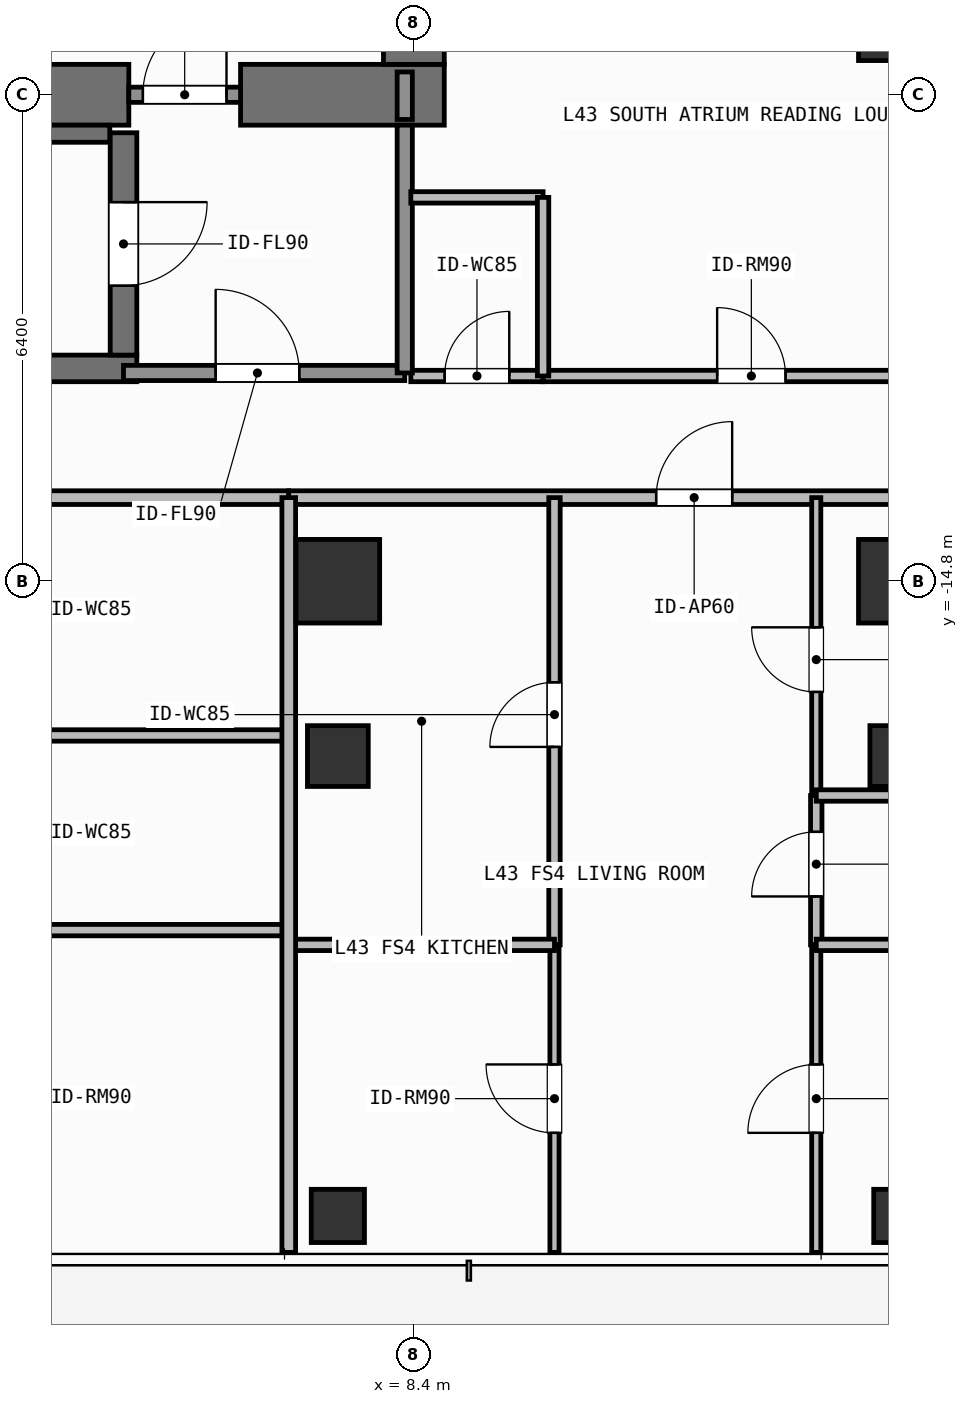
"""IFC4 building model, lengths in metres.
Left out: names, types, materials, properties, quantities, classifications, styles, units other than length and angle.
Written with IfcOpenShell. Run it as: python <this file> out.ifc"""

import sys

from ifc_helpers import new_model, si_unit, direction, frame, frame_2d, origin, origin_2d, place, context, subcontext, project, spatial, rectangle, hollow_rectangle, extrude, element, fill, save


model = new_model("IFC4")
c1 = context("Model", 3, precision=1e-05, world=origin(), true_north=direction((0.0, 1.0)))
c2 = subcontext(c1, "Body", "Model", "MODEL_VIEW")
j1 = project(units=[si_unit("LENGTHUNIT", "METRE"), si_unit("PLANEANGLEUNIT", "RADIAN")], contexts=[c1])
p1 = place(None, origin())
s1 = spatial("IfcSite", under=j1, at=p1, CompositionType="ELEMENT")
p2 = place(p1, origin())
s2 = spatial("IfcBuilding", under=s1, at=p2, CompositionType="ELEMENT")
p3 = place(p2, frame((0.0, 0.0, 175.8)))
s3 = spatial("IfcBuildingStorey", under=s2, at=p3, CompositionType="ELEMENT", Elevation=175.8)
p4 = place(p3, frame((-2.62, -8.4, 0.0), z_axis=(0.0, 0.0, 1.0), x_axis=(1.0, 0.0, 0.0)))
e1 = element("IfcWall", 1, at=p4, inside=s3, PredefinedType="SHEAR", context=c2, shape_type="SweptSolid", body=[
    extrude(rectangle(XDim=7.27, YDim=0.8, at=frame_2d((3.635, 0.0))), origin(), (0.0, 0.0, 1.0), 3.9),
])
p5 = place(p3, frame((6.12, -8.4, 0.0), z_axis=(0.0, 0.0, 1.0), x_axis=(1.0, 0.0, 0.0)))
e2 = element("IfcWall", 2, at=p5, inside=s3, PredefinedType="SHEAR", context=c2, shape_type="SweptSolid", body=[
    extrude(rectangle(XDim=2.68, YDim=0.8, at=frame_2d((1.34, 0.0))), origin(), (0.0, 0.0, 1.0), 3.9),
])
p6 = place(p3, frame((8.4, -8.0, 0.0), z_axis=(0.0, 0.0, 1.0), x_axis=(0.0, 1.0, 0.0)))
e3 = element("IfcWall", 3, at=p6, inside=s3, PredefinedType="SHEAR", context=c2, shape_type="SweptSolid", body=[
    extrude(rectangle(XDim=2.175, YDim=0.8, at=frame_2d((1.087, 0.0))), origin(), (0.0, 0.0, 1.0), 3.9),
])
p7 = place(p3, frame((-2.555, -12.0, 0.0), z_axis=(0.0, 0.0, 1.0), x_axis=(1.0, 0.0, 0.0)))
e4 = element("IfcWall", 4, at=p7, inside=s3, PredefinedType="SHEAR", context=c2, shape_type="SweptSolid", body=[
    extrude(rectangle(XDim=7.31, YDim=0.35, at=frame_2d((3.655, 0.0))), origin(), (0.0, 0.0, 1.0), 3.9),
])
p8 = place(p3, frame((-2.2, -8.913, 0.0), z_axis=(0.0, 0.0, 1.0), x_axis=(1.0, 0.0, 0.0)))
e5 = element("IfcWall", 5, at=p8, inside=s3, PredefinedType="SHEAR", context=c2, shape_type="SweptSolid", body=[
    extrude(rectangle(XDim=6.6, YDim=0.225, at=frame_2d((3.3, 0.0))), origin(), (0.0, 0.0, 1.0), 3.9),
])
p9 = place(p3, frame((4.58, -8.9, 0.0), z_axis=(0.0, 0.0, 1.0), x_axis=(0.0, -1.0, 0.0)))
e6 = element("IfcWall", 6, at=p9, inside=s3, PredefinedType="SHEAR", context=c2, shape_type="SweptSolid", body=[
    extrude(rectangle(XDim=2.925, YDim=0.35, at=frame_2d((1.462, 0.0))), origin(), (0.0, 0.0, 1.0), 3.9),
])
p10 = place(p9, frame((0.913, 0.0, 0.0)))
e7 = element("IfcOpeningElement", 7, at=p10, cuts=e6, PredefinedType="OPENING", context=c2, shape_type="SweptSolid", body=[
    extrude(rectangle(XDim=1.1, YDim=2.15, at=frame_2d((0.55, 1.075))), frame((0.0, 0.185, 0.0), z_axis=(0.0, -1.0, 0.0), x_axis=(1.0, 0.0, 0.0)), (0.0, 0.0, 1.0), 0.37),
])
for number, where, z_axis, x_axis in (
    (8, (7.4, -14.8, 0.0), (0.0, 0.0, 1.0), (1.0, 0.0, 0.0)),
    (9, (14.8, -14.8, 0.0), (0.0, 0.0, 1.0), (1.0, 0.0, 0.0)),
    (10, (14.8, -7.4, 0.0), (0.0, 0.0, 1.0), (1.0, 0.0, 0.0)),
):
    element("IfcColumn", number, at=place(p3, frame(where, z_axis=z_axis, x_axis=x_axis)), inside=s3, PredefinedType="COLUMN", context=c2, shape_type="SweptSolid", body=[
        extrude(rectangle(XDim=1.1, YDim=1.1, at=origin_2d()), origin(), (0.0, 0.0, 1.0), 3.9),
    ])
for number, where, z_axis, x_axis in (
    (11, (7.4, -17.1, 0.0), (0.0, 0.0, 1.0), (1.0, 0.0, 0.0)),
    (12, (14.8, -17.1, 0.0), (0.0, 0.0, 1.0), (1.0, 0.0, 0.0)),
):
    element("IfcColumn", number, at=place(p3, frame(where, z_axis=z_axis, x_axis=x_axis)), inside=s3, PredefinedType="COLUMN", context=c2, shape_type="SweptSolid", body=[
        extrude(hollow_rectangle(XDim=0.8, YDim=0.8, WallThickness=0.036, at=origin_2d()), origin(), (0.0, 0.0, 1.0), 3.9),
    ])
for number, where, z_axis, x_axis in (
    (13, (7.4, -23.15, 0.0), (0.0, 0.0, 1.0), (1.0, 0.0, 0.0)),
    (14, (14.8, -23.15, 0.0), (0.0, 0.0, 1.0), (1.0, 0.0, 0.0)),
):
    element("IfcColumn", number, at=place(p3, frame(where, z_axis=z_axis, x_axis=x_axis)), inside=s3, PredefinedType="COLUMN", context=c2, shape_type="SweptSolid", body=[
        extrude(hollow_rectangle(XDim=0.7, YDim=0.7, WallThickness=0.032, at=origin_2d()), origin(), (0.0, 0.0, 1.0), 3.9),
    ])
p11 = place(p3, frame((4.58, -12.06, 0.0), z_axis=(0.0, 0.0, 1.0), x_axis=(1.0, 0.0, 0.0)))
e15 = element("IfcWall", 15, at=p11, inside=s3, PredefinedType="SOLIDWALL", context=c2, shape_type="SweptSolid", body=[
    extrude(rectangle(XDim=3.7, YDim=0.2, at=frame_2d((1.85, 0.0))), origin(), (0.0, 0.0, 1.0), 3.68),
])
p12 = place(p11, frame((1.212, 0.0, 0.0)))
e16 = element("IfcOpeningElement", 16, at=p12, cuts=e15, PredefinedType="OPENING", context=c2, shape_type="SweptSolid", body=[
    extrude(rectangle(XDim=1.1, YDim=2.15, at=frame_2d((0.55, 1.075))), frame((0.0, 0.11, 0.0), z_axis=(0.0, -1.0, 0.0), x_axis=(1.0, 0.0, 0.0)), (0.0, 0.0, 1.0), 0.22),
])
p13 = place(p3, frame((4.65, -8.4, 0.0), z_axis=(0.0, 0.0, 1.0), x_axis=(1.0, 0.0, 0.0)))
e17 = element("IfcWall", 17, at=p13, inside=s3, PredefinedType="SOLIDWALL", context=c2, shape_type="SweptSolid", body=[
    extrude(rectangle(XDim=1.47, YDim=0.2, at=frame_2d((0.735, 0.0))), origin(), (0.0, 0.0, 1.0), 2.82),
])
p14 = place(p13, frame((0.185, 0.0, 0.0)))
e18 = element("IfcOpeningElement", 18, at=p14, cuts=e17, PredefinedType="OPENING", context=c2, shape_type="SweptSolid", body=[
    extrude(rectangle(XDim=1.1, YDim=2.15, at=frame_2d((0.55, 1.075))), frame((0.0, 0.11, 0.0), z_axis=(0.0, -1.0, 0.0), x_axis=(1.0, 0.0, 0.0)), (0.0, 0.0, 1.0), 0.22),
])
p15 = place(p3, frame((8.36, -12.1, 0.0), z_axis=(0.0, 0.0, 1.0), x_axis=(1.0, 0.0, 0.0)))
e19 = element("IfcWall", 19, at=p15, inside=s3, PredefinedType="PARTITIONING", context=c2, shape_type="SweptSolid", body=[
    extrude(rectangle(XDim=1.74, YDim=0.15, at=frame_2d((0.87, 0.0))), origin(), (0.0, 0.0, 1.0), 3.68),
])
p16 = place(p15, frame((0.445, 0.0, 0.0)))
e20 = element("IfcOpeningElement", 20, at=p16, cuts=e19, PredefinedType="OPENING", context=c2, shape_type="SweptSolid", body=[
    extrude(rectangle(XDim=0.85, YDim=2.1, at=frame_2d((0.425, 1.05))), frame((0.0, 0.085, 0.0), z_axis=(0.0, -1.0, 0.0), x_axis=(1.0, 0.0, 0.0)), (0.0, 0.0, 1.0), 0.17),
])
p17 = place(p3, frame((10.1, -12.1, 0.0), z_axis=(0.0, 0.0, 1.0), x_axis=(1.0, 0.0, 0.0)))
e21 = element("IfcWall", 21, at=p17, inside=s3, PredefinedType="PARTITIONING", context=c2, shape_type="SweptSolid", body=[
    extrude(rectangle(XDim=5.48, YDim=0.15, at=frame_2d((2.74, 0.0))), origin(), (0.0, 0.0, 1.0), 3.68),
])
p18 = place(p17, frame((2.29, 0.0, 0.0)))
e22 = element("IfcOpeningElement", 22, at=p18, cuts=e21, PredefinedType="OPENING", context=c2, shape_type="SweptSolid", body=[
    extrude(rectangle(XDim=0.9, YDim=2.1, at=frame_2d((0.45, 1.05))), frame((0.0, 0.085, 0.0), z_axis=(0.0, -1.0, 0.0), x_axis=(1.0, 0.0, 0.0)), (0.0, 0.0, 1.0), 0.17),
])
p19 = place(p3, frame((-1.9, -13.7, 0.0), z_axis=(0.0, 0.0, 1.0), x_axis=(1.0, 0.0, 0.0)))
e23 = element("IfcWall", 23, at=p19, inside=s3, PredefinedType="PARTITIONING", context=c2, shape_type="SweptSolid", body=[
    extrude(rectangle(XDim=8.654, YDim=0.18, at=frame_2d((4.327, 0.0))), origin(), (0.0, 0.0, 1.0), 3.68),
])
p20 = place(p19, frame((2.664, 0.0, 0.0)))
e24 = element("IfcOpeningElement", 24, at=p20, cuts=e23, PredefinedType="OPENING", context=c2, shape_type="SweptSolid", body=[
    extrude(rectangle(XDim=1.0, YDim=2.2, at=frame_2d((0.5, 1.1))), frame((0.0, 0.1, 0.0), z_axis=(0.0, -1.0, 0.0), x_axis=(1.0, 0.0, 0.0)), (0.0, 0.0, 1.0), 0.2),
])
p21 = place(p3, frame((6.754, -13.7, 0.0), z_axis=(0.0, 0.0, 1.0), x_axis=(1.0, 0.0, 0.0)))
e25 = element("IfcWall", 25, at=p21, inside=s3, PredefinedType="PARTITIONING", context=c2, shape_type="SweptSolid", body=[
    extrude(rectangle(XDim=11.566, YDim=0.18, at=frame_2d((5.783, 0.0))), origin(), (0.0, 0.0, 1.0), 3.68),
])
p22 = place(p21, frame((4.833, 0.0, 0.0)))
e26 = element("IfcOpeningElement", 26, at=p22, cuts=e25, PredefinedType="OPENING", context=c2, shape_type="SweptSolid", body=[
    extrude(rectangle(XDim=1.0, YDim=2.2, at=frame_2d((0.5, 1.1))), frame((0.0, 0.1, 0.0), z_axis=(0.0, -1.0, 0.0), x_axis=(1.0, 0.0, 0.0)), (0.0, 0.0, 1.0), 0.2),
])
p23 = place(p3, frame((10.25, -19.584, 0.0), z_axis=(0.0, 0.0, 1.0), x_axis=(0.0, 1.0, 0.0)))
e27 = element("IfcWall", 27, at=p23, inside=s3, PredefinedType="PARTITIONING", context=c2, shape_type="SweptSolid", body=[
    extrude(rectangle(XDim=5.884, YDim=0.15, at=frame_2d((2.942, 0.0))), origin(), (0.0, 0.0, 1.0), 3.68),
])
p24 = place(p23, frame((2.604, 0.0, 0.0)))
e28 = element("IfcOpeningElement", 28, at=p24, cuts=e27, PredefinedType="OPENING", context=c2, shape_type="SweptSolid", body=[
    extrude(rectangle(XDim=0.85, YDim=2.1, at=frame_2d((0.425, 1.05))), frame((0.0, 0.085, 0.0), z_axis=(0.0, -1.0, 0.0), x_axis=(1.0, 0.0, 0.0)), (0.0, 0.0, 1.0), 0.17),
])
p25 = place(p3, frame((10.25, -23.63, 0.0), z_axis=(0.0, 0.0, 1.0), x_axis=(0.0, 1.0, 0.0)))
e29 = element("IfcWall", 29, at=p25, inside=s3, PredefinedType="PARTITIONING", context=c2, shape_type="SweptSolid", body=[
    extrude(rectangle(XDim=4.046, YDim=0.12, at=frame_2d((2.023, 0.0))), origin(), (0.0, 0.0, 1.0), 3.68),
])
p26 = place(p25, frame((1.573, 0.0, 0.0)))
e30 = element("IfcOpeningElement", 30, at=p26, cuts=e29, PredefinedType="OPENING", context=c2, shape_type="SweptSolid", body=[
    extrude(rectangle(XDim=0.9, YDim=2.1, at=frame_2d((0.45, 1.05))), frame((0.0, 0.07, 0.0), z_axis=(0.0, -1.0, 0.0), x_axis=(1.0, 0.0, 0.0)), (0.0, 0.0, 1.0), 0.14),
])
p27 = place(p3, frame((13.694, -19.584, 0.0), z_axis=(0.0, 0.0, 1.0), x_axis=(0.0, 1.0, 0.0)))
e31 = element("IfcWall", 31, at=p27, inside=s3, PredefinedType="PARTITIONING", context=c2, shape_type="SweptSolid", body=[
    extrude(rectangle(XDim=1.965, YDim=0.15, at=frame_2d((0.982, 0.0))), origin(), (0.0, 0.0, 1.0), 3.68),
])
p28 = place(p27, frame((0.637, 0.0, 0.0)))
e32 = element("IfcOpeningElement", 32, at=p28, cuts=e31, PredefinedType="OPENING", context=c2, shape_type="SweptSolid", body=[
    extrude(rectangle(XDim=0.85, YDim=2.1, at=frame_2d((0.425, 1.05))), frame((0.0, 0.085, 0.0), z_axis=(0.0, -1.0, 0.0), x_axis=(1.0, 0.0, 0.0)), (0.0, 0.0, 1.0), 0.17),
])
p29 = place(p3, frame((13.694, -17.619, 0.0), z_axis=(0.0, 0.0, 1.0), x_axis=(0.0, 1.0, 0.0)))
e33 = element("IfcWall", 33, at=p29, inside=s3, PredefinedType="PARTITIONING", context=c2, shape_type="SweptSolid", body=[
    extrude(rectangle(XDim=3.919, YDim=0.12, at=frame_2d((1.959, 0.0))), origin(), (0.0, 0.0, 1.0), 3.68),
])
p30 = place(p29, frame((1.363, 0.0, 0.0)))
e34 = element("IfcOpeningElement", 34, at=p30, cuts=e33, PredefinedType="OPENING", context=c2, shape_type="SweptSolid", body=[
    extrude(rectangle(XDim=0.85, YDim=2.1, at=frame_2d((0.425, 1.05))), frame((0.0, 0.07, 0.0), z_axis=(0.0, -1.0, 0.0), x_axis=(1.0, 0.0, 0.0)), (0.0, 0.0, 1.0), 0.14),
])
p31 = place(p3, frame((13.694, -23.63, 0.0), z_axis=(0.0, 0.0, 1.0), x_axis=(0.0, 1.0, 0.0)))
e35 = element("IfcWall", 35, at=p31, inside=s3, PredefinedType="PARTITIONING", context=c2, shape_type="SweptSolid", body=[
    extrude(rectangle(XDim=4.046, YDim=0.12, at=frame_2d((2.023, 0.0))), origin(), (0.0, 0.0, 1.0), 3.68),
])
p32 = place(p31, frame((1.573, 0.0, 0.0)))
e36 = element("IfcOpeningElement", 36, at=p32, cuts=e35, PredefinedType="OPENING", context=c2, shape_type="SweptSolid", body=[
    extrude(rectangle(XDim=0.9, YDim=2.1, at=frame_2d((0.45, 1.05))), frame((0.0, 0.07, 0.0), z_axis=(0.0, -1.0, 0.0), x_axis=(1.0, 0.0, 0.0)), (0.0, 0.0, 1.0), 0.14),
])
p33 = place(p3, frame((8.28, -12.06, 0.0), z_axis=(0.0, 0.0, 1.0), x_axis=(0.0, 1.0, 0.0)))
e37 = element("IfcWall", 37, at=p33, inside=s3, PredefinedType="SOLIDWALL", context=c2, shape_type="SweptSolid", body=[
    extrude(rectangle(XDim=3.26, YDim=0.2, at=frame_2d((1.63, 0.0))), origin(), (0.0, 0.0, 1.0), 3.68),
])
p34 = place(p3, frame((8.28, -8.725, 0.0), z_axis=(0.0, 0.0, 1.0), x_axis=(0.0, 1.0, 0.0)))
e38 = element("IfcWall", 38, at=p34, inside=s3, PredefinedType="SOLIDWALL", context=c2, shape_type="SweptSolid", body=[
    extrude(rectangle(XDim=0.625, YDim=0.2, at=frame_2d((0.312, 0.0))), origin(), (0.0, 0.0, 1.0), 3.68),
])
p35 = place(p3, frame((8.36, -9.75, 0.0), z_axis=(0.0, 0.0, 1.0), x_axis=(1.0, 0.0, 0.0)))
e39 = element("IfcWall", 39, at=p35, inside=s3, PredefinedType="PARTITIONING", context=c2, shape_type="SweptSolid", body=[
    extrude(rectangle(XDim=1.74, YDim=0.15, at=frame_2d((0.87, 0.0))), origin(), (0.0, 0.0, 1.0), 3.68),
])
p36 = place(p3, frame((10.1, -12.1, 0.0), z_axis=(0.0, 0.0, 1.0), x_axis=(0.0, 1.0, 0.0)))
e40 = element("IfcWall", 40, at=p36, inside=s3, PredefinedType="PARTITIONING", context=c2, shape_type="SweptSolid", body=[
    extrude(rectangle(XDim=2.35, YDim=0.15, at=frame_2d((1.175, 0.0))), origin(), (0.0, 0.0, 1.0), 3.68),
])
p37 = place(p3, frame((2.254, -16.829, 0.0), z_axis=(0.0, 0.0, 1.0), x_axis=(1.0, 0.0, 0.0)))
e41 = element("IfcWall", 41, at=p37, inside=s3, PredefinedType="PARTITIONING", context=c2, shape_type="SweptSolid", body=[
    extrude(rectangle(XDim=4.5, YDim=0.15, at=frame_2d((2.25, 0.0))), origin(), (0.0, 0.0, 1.0), 3.082),
])
p38 = place(p3, frame((2.254, -19.39, 0.0), z_axis=(0.0, 0.0, 1.0), x_axis=(1.0, 0.0, 0.0)))
e42 = element("IfcWall", 42, at=p38, inside=s3, PredefinedType="PARTITIONING", context=c2, shape_type="SweptSolid", body=[
    extrude(rectangle(XDim=4.5, YDim=0.15, at=frame_2d((2.25, 0.0))), origin(), (0.0, 0.0, 1.0), 3.68),
])
p39 = place(p3, frame((6.754, -19.584, 0.0), z_axis=(0.0, 0.0, 1.0), x_axis=(1.0, 0.0, 0.0)))
e43 = element("IfcWall", 43, at=p39, inside=s3, PredefinedType="PARTITIONING", context=c2, shape_type="SweptSolid", body=[
    extrude(rectangle(XDim=3.496, YDim=0.15, at=frame_2d((1.748, 0.0))), origin(), (0.0, 0.0, 1.0), 3.68),
])
for number, where, z_axis, x_axis in (
    (44, (13.694, -17.619, 0.0), (0.0, 0.0, 1.0), (1.0, 0.0, 0.0)),
    (45, (13.694, -19.584, 0.0), (0.0, 0.0, 1.0), (1.0, 0.0, 0.0)),
):
    element("IfcWall", number, at=place(p3, frame(where, z_axis=z_axis, x_axis=x_axis)), inside=s3, PredefinedType="PARTITIONING", context=c2, shape_type="SweptSolid", body=[
        extrude(rectangle(XDim=4.626, YDim=0.15, at=frame_2d((2.313, 0.0))), origin(), (0.0, 0.0, 1.0), 3.68),
    ])
p40 = place(p3, frame((6.754, -23.63, 0.0), z_axis=(0.0, 0.0, 1.0), x_axis=(0.0, 1.0, 0.0)))
e46 = element("IfcWall", 46, at=p40, inside=s3, PredefinedType="PARTITIONING", context=c2, shape_type="SweptSolid", body=[
    extrude(rectangle(XDim=9.93, YDim=0.18, at=frame_2d((4.965, 0.0))), origin(), (0.0, 0.0, 1.0), 3.68),
])
p41 = place(p10, origin())
e47 = element("IfcDoor", 47, at=p41, inside=s3, OperationType="SINGLE_SWING_LEFT", PredefinedType="DOOR", context=c2, shape_type="SweptSolid", body=[
    extrude(rectangle(XDim=1.1, YDim=2.15, at=frame_2d((0.55, 1.075))), frame((0.0, 0.025, 0.0), z_axis=(0.0, -1.0, 0.0), x_axis=(1.0, 0.0, 0.0)), (0.0, 0.0, 1.0), 0.05),
])
fill(e7, e47)
p42 = place(p12, origin())
e48 = element("IfcDoor", 48, at=p42, inside=s3, OperationType="SINGLE_SWING_LEFT", PredefinedType="DOOR", context=c2, shape_type="SweptSolid", body=[
    extrude(rectangle(XDim=1.1, YDim=2.15, at=frame_2d((0.55, 1.075))), frame((0.0, 0.025, 0.0), z_axis=(0.0, -1.0, 0.0), x_axis=(1.0, 0.0, 0.0)), (0.0, 0.0, 1.0), 0.05),
])
fill(e16, e48)
p43 = place(p14, origin())
e49 = element("IfcDoor", 49, at=p43, inside=s3, OperationType="SINGLE_SWING_RIGHT", PredefinedType="DOOR", context=c2, shape_type="SweptSolid", body=[
    extrude(rectangle(XDim=1.1, YDim=2.15, at=frame_2d((0.55, 1.075))), frame((0.0, 0.025, 0.0), z_axis=(0.0, -1.0, 0.0), x_axis=(1.0, 0.0, 0.0)), (0.0, 0.0, 1.0), 0.05),
])
fill(e18, e49)
p44 = place(p16, origin())
e50 = element("IfcDoor", 50, at=p44, inside=s3, OperationType="SINGLE_SWING_RIGHT", PredefinedType="DOOR", context=c2, shape_type="SweptSolid", body=[
    extrude(rectangle(XDim=0.85, YDim=2.1, at=frame_2d((0.425, 1.05))), frame((0.0, 0.025, 0.0), z_axis=(0.0, -1.0, 0.0), x_axis=(1.0, 0.0, 0.0)), (0.0, 0.0, 1.0), 0.05),
])
fill(e20, e50)
p45 = place(p18, origin())
e51 = element("IfcDoor", 51, at=p45, inside=s3, OperationType="SINGLE_SWING_LEFT", PredefinedType="DOOR", context=c2, shape_type="SweptSolid", body=[
    extrude(rectangle(XDim=0.9, YDim=2.1, at=frame_2d((0.45, 1.05))), frame((0.0, 0.025, 0.0), z_axis=(0.0, -1.0, 0.0), x_axis=(1.0, 0.0, 0.0)), (0.0, 0.0, 1.0), 0.05),
])
fill(e22, e51)
p46 = place(p22, origin())
e52 = element("IfcDoor", 52, at=p46, inside=s3, OperationType="SINGLE_SWING_RIGHT", PredefinedType="DOOR", context=c2, shape_type="SweptSolid", body=[
    extrude(rectangle(XDim=1.0, YDim=2.2, at=frame_2d((0.5, 1.1))), frame((0.0, 0.025, 0.0), z_axis=(0.0, -1.0, 0.0), x_axis=(1.0, 0.0, 0.0)), (0.0, 0.0, 1.0), 0.05),
])
fill(e26, e52)
p47 = place(p24, origin())
e53 = element("IfcDoor", 53, at=p47, inside=s3, OperationType="SINGLE_SWING_LEFT", PredefinedType="DOOR", context=c2, shape_type="SweptSolid", body=[
    extrude(rectangle(XDim=0.85, YDim=2.1, at=frame_2d((0.425, 1.05))), frame((0.0, 0.025, 0.0), z_axis=(0.0, -1.0, 0.0), x_axis=(1.0, 0.0, 0.0)), (0.0, 0.0, 1.0), 0.05),
])
fill(e28, e53)
p48 = place(p26, origin())
e54 = element("IfcDoor", 54, at=p48, inside=s3, OperationType="SINGLE_SWING_RIGHT", PredefinedType="DOOR", context=c2, shape_type="SweptSolid", body=[
    extrude(rectangle(XDim=0.9, YDim=2.1, at=frame_2d((0.45, 1.05))), frame((0.0, 0.025, 0.0), z_axis=(0.0, -1.0, 0.0), x_axis=(1.0, 0.0, 0.0)), (0.0, 0.0, 1.0), 0.05),
])
fill(e30, e54)
p49 = place(p28, origin())
e55 = element("IfcDoor", 55, at=p49, inside=s3, OperationType="SINGLE_SWING_LEFT", PredefinedType="DOOR", context=c2, shape_type="SweptSolid", body=[
    extrude(rectangle(XDim=0.85, YDim=2.1, at=frame_2d((0.425, 1.05))), frame((0.0, 0.025, 0.0), z_axis=(0.0, -1.0, 0.0), x_axis=(1.0, 0.0, 0.0)), (0.0, 0.0, 1.0), 0.05),
])
fill(e32, e55)
p50 = place(p30, origin())
e56 = element("IfcDoor", 56, at=p50, inside=s3, OperationType="SINGLE_SWING_RIGHT", PredefinedType="DOOR", context=c2, shape_type="SweptSolid", body=[
    extrude(rectangle(XDim=0.85, YDim=2.1, at=frame_2d((0.425, 1.05))), frame((0.0, 0.025, 0.0), z_axis=(0.0, -1.0, 0.0), x_axis=(1.0, 0.0, 0.0)), (0.0, 0.0, 1.0), 0.05),
])
fill(e34, e56)
p51 = place(p32, origin())
e57 = element("IfcDoor", 57, at=p51, inside=s3, OperationType="SINGLE_SWING_LEFT", PredefinedType="DOOR", context=c2, shape_type="SweptSolid", body=[
    extrude(rectangle(XDim=0.9, YDim=2.1, at=frame_2d((0.45, 1.05))), frame((0.0, 0.025, 0.0), z_axis=(0.0, -1.0, 0.0), x_axis=(1.0, 0.0, 0.0)), (0.0, 0.0, 1.0), 0.05),
])
fill(e36, e57)
save(model, sys.argv[1])
